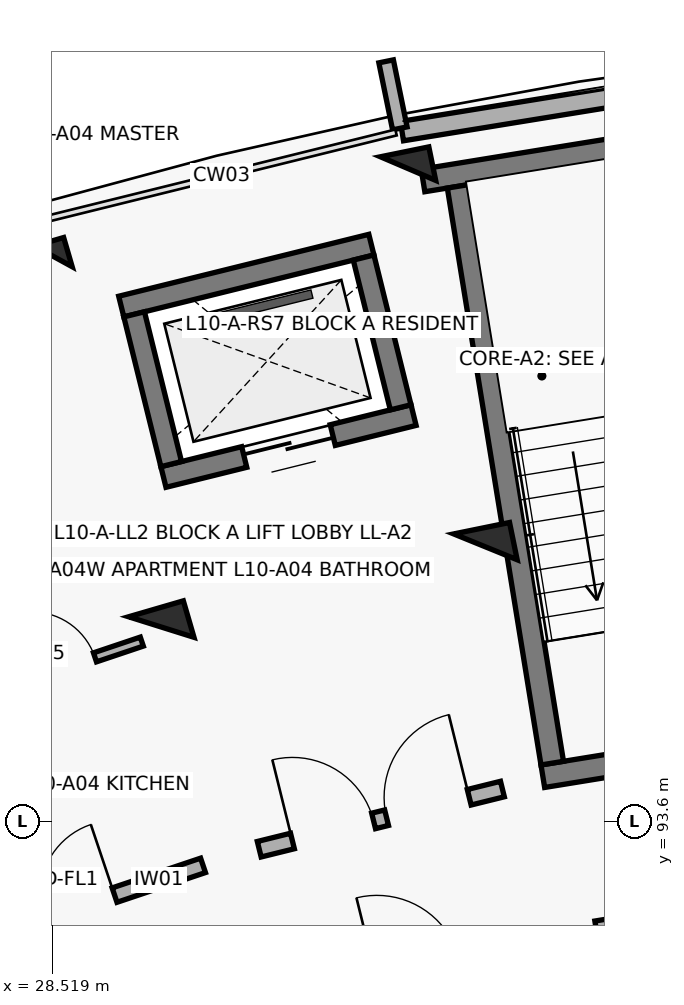
"""IFC4 building model, lengths in metres.
Left out: names, types, materials, properties, quantities, classifications, styles, units other than length and angle.
Written with IfcOpenShell. Run it as: python <this file> out.ifc"""

import sys

from ifc_helpers import new_model, si_unit, direction, frame, frame_2d, origin, origin_2d, place, context, subcontext, project, spatial, rectangle, extrude, element, fill, save


model = new_model("IFC4")
c1 = context("Model", 3, precision=1e-05, world=origin(), true_north=direction((0.0, 1.0)))
c2 = subcontext(c1, "Body", "Model", "MODEL_VIEW")
j1 = project(units=[si_unit("LENGTHUNIT", "METRE"), si_unit("PLANEANGLEUNIT", "RADIAN")], contexts=[c1])
p1 = place(None, origin())
s1 = spatial("IfcSite", under=j1, at=p1, CompositionType="ELEMENT")
p2 = place(p1, origin())
s2 = spatial("IfcBuilding", under=s1, at=p2, CompositionType="ELEMENT")
p3 = place(p2, frame((0.0, 0.0, 32.9)))
s3 = spatial("IfcBuildingStorey", under=s2, at=p3, CompositionType="ELEMENT", Elevation=32.9)
p4 = place(p3, frame((29.954, 96.153, 0.0), z_axis=(0.0, 0.0, 1.0), x_axis=(-0.27966144946, 0.96009867914, 0.0)))
e1 = element("IfcColumn", 1, at=p4, inside=s3, PredefinedType="COLUMN", context=c2, shape_type="SweptSolid", body=[
    extrude(rectangle(XDim=0.5, YDim=0.75, at=origin_2d()), origin(), (0.0, 0.0, 1.0), 3.1),
])
p5 = place(p3, frame((28.533, 101.031, 0.0), z_axis=(0.0, 0.0, 1.0), x_axis=(-0.27966144946, 0.96009867914, 0.0)))
e2 = element("IfcColumn", 2, at=p5, inside=s3, PredefinedType="COLUMN", context=c2, shape_type="SweptSolid", body=[
    extrude(rectangle(XDim=0.4, YDim=0.4, at=origin_2d()), origin(), (0.0, 0.0, 1.0), 3.1),
])
p6 = place(p3, frame((34.219, 97.209, 0.0), z_axis=(0.0, 0.0, 1.0), x_axis=(-0.200393999665, 0.979715389742, 0.0)))
e3 = element("IfcColumn", 3, at=p6, inside=s3, PredefinedType="COLUMN", context=c2, shape_type="SweptSolid", body=[
    extrude(rectangle(XDim=0.5, YDim=0.75, at=origin_2d()), origin(), (0.0, 0.0, 1.0), 3.1),
])
p7 = place(p3, frame((33.201, 102.186, 0.0), z_axis=(0.0, 0.0, 1.0), x_axis=(-0.200393999665, 0.979715389742, 0.0)))
e4 = element("IfcColumn", 4, at=p7, inside=s3, PredefinedType="COLUMN", context=c2, shape_type="SweptSolid", body=[
    extrude(rectangle(XDim=0.45, YDim=0.65, at=origin_2d()), origin(), (0.0, 0.0, 1.0), 3.1),
])
p8 = place(p3, frame((33.12, 102.679, 0.0), z_axis=(0.0, 0.0, 1.0), x_axis=(0.987080750493, 0.160223568819, 0.0)))
e5 = element("IfcWall", 5, at=p8, inside=s3, PredefinedType="SOLIDWALL", context=c2, shape_type="SweptSolid", body=[
    extrude(rectangle(XDim=4.809, YDim=0.258, at=frame_2d((2.404, 0.0))), origin(), (0.0, 0.0, 1.0), 2.25),
])
p9 = place(p3, frame((33.093, 102.715, 0.0), z_axis=(0.0, 0.0, 1.0), x_axis=(-0.200183211319, 0.979758481416, 0.0)))
e6 = element("IfcWall", 6, at=p9, inside=s3, PredefinedType="PARAPET", context=c2, shape_type="SweptSolid", body=[
    extrude(rectangle(XDim=0.9, YDim=0.195, at=frame_2d((0.45, 0.0))), origin(), (0.0, 0.0, 1.0), 2.25),
])
p10 = place(p3, frame((38.794, 94.811, 0.0), z_axis=(0.0, 0.0, 1.0), x_axis=(-0.987077443397, -0.160243941341, 0.0)))
e7 = element("IfcWall", 7, at=p10, inside=s3, PredefinedType="SHEAR", context=c2, shape_type="SweptSolid", body=[
    extrude(rectangle(XDim=3.87, YDim=0.3, at=frame_2d((1.935, 0.0))), origin(), (0.0, 0.0, 1.0), 3.1),
])
p11 = place(p10, frame((1.41, 0.0, 0.0)))
e8 = element("IfcOpeningElement", 8, at=p11, cuts=e7, PredefinedType="OPENING", context=c2, shape_type="SweptSolid", body=[
    extrude(rectangle(XDim=1.05, YDim=2.15, at=frame_2d((0.525, 1.075))), frame((0.0, 0.16, 0.0), z_axis=(0.0, -1.0, 0.0), x_axis=(1.0, 0.0, 0.0)), (0.0, 0.0, 1.0), 0.32),
])
p12 = place(p3, frame((37.81, 102.745, 0.0), z_axis=(0.0, 0.0, 1.0), x_axis=(-0.987084710126, -0.160199173019, 0.0)))
e9 = element("IfcWall", 9, at=p12, inside=s3, PredefinedType="SHEAR", context=c2, shape_type="SweptSolid", body=[
    extrude(rectangle(XDim=4.47, YDim=0.3, at=frame_2d((2.235, 0.0))), origin(), (0.0, 0.0, 1.0), 3.1),
])
p13 = place(p3, frame((35.098, 94.363, 0.0), z_axis=(0.0, 0.0, 1.0), x_axis=(-0.160227496777, 0.987080112897, 0.0)))
e10 = element("IfcWall", 10, at=p13, inside=s3, PredefinedType="SHEAR", context=c2, shape_type="SweptSolid", body=[
    extrude(rectangle(XDim=7.69, YDim=0.3, at=frame_2d((3.845, 0.0))), origin(), (0.0, 0.0, 1.0), 3.1),
])
p14 = place(p3, frame((33.273, 98.942, 0.0), z_axis=(0.0, 0.0, 1.0), x_axis=(-0.970707542441, -0.240264160972, 0.0)))
e11 = element("IfcWall", 11, at=p14, inside=s3, PredefinedType="SHEAR", context=c2, shape_type="SweptSolid", body=[
    extrude(rectangle(XDim=3.39, YDim=0.28, at=frame_2d((1.695, 0.0))), origin(), (0.0, 0.0, 1.0), 3.1),
])
p15 = place(p14, frame((1.095, 0.0, 0.0)))
e12 = element("IfcOpeningElement", 12, at=p15, cuts=e11, PredefinedType="OPENING", context=c2, shape_type="SweptSolid", body=[
    extrude(rectangle(XDim=1.2, YDim=2.15, at=frame_2d((0.6, 1.075))), frame((0.0, 0.15, 0.0), z_axis=(0.0, -1.0, 0.0), x_axis=(1.0, 0.0, 0.0)), (0.0, 0.0, 1.0), 0.3),
])
p16 = place(p3, frame((32.718, 101.185, 0.0), z_axis=(0.0, 0.0, 1.0), x_axis=(-0.970711699588, -0.240247364777, 0.0)))
e13 = element("IfcWall", 13, at=p16, inside=s3, PredefinedType="SHEAR", context=c2, shape_type="SweptSolid", body=[
    extrude(rectangle(XDim=3.39, YDim=0.28, at=frame_2d((1.695, 0.0))), origin(), (0.0, 0.0, 1.0), 3.1),
])
p17 = place(p3, frame((33.104, 99.044, 0.0), z_axis=(0.0, 0.0, 1.0), x_axis=(-0.240186044774, 0.970726873995, 0.0)))
e14 = element("IfcWall", 14, at=p17, inside=s3, PredefinedType="SHEAR", context=c2, shape_type="SweptSolid", body=[
    extrude(rectangle(XDim=2.03, YDim=0.28, at=frame_2d((1.015, 0.0))), origin(), (0.0, 0.0, 1.0), 3.1),
])
p18 = place(p3, frame((30.085, 98.297, 0.0), z_axis=(0.0, 0.0, 1.0), x_axis=(-0.2402993748, 0.970698825832, 0.0)))
e15 = element("IfcWall", 15, at=p18, inside=s3, PredefinedType="SHEAR", context=c2, shape_type="SweptSolid", body=[
    extrude(rectangle(XDim=2.03, YDim=0.28, at=frame_2d((1.015, 0.0))), origin(), (0.0, 0.0, 1.0), 3.1),
])
p19 = place(p3, frame((27.247, 91.923, 0.0), z_axis=(0.0, 0.0, 1.0), x_axis=(0.947863007629, 0.318678080151, 0.0)))
e16 = element("IfcWall", 16, at=p19, inside=s3, PredefinedType="SOLIDWALL", context=c2, shape_type="SweptSolid", body=[
    extrude(rectangle(XDim=3.436, YDim=0.2, at=frame_2d((1.718, 0.0))), origin(), (0.0, 0.0, 1.0), 2.08),
])
p20 = place(p19, frame((1.228, 0.0, 0.0)))
e17 = element("IfcOpeningElement", 17, at=p20, cuts=e16, PredefinedType="OPENING", context=c2, shape_type="SweptSolid", body=[
    extrude(rectangle(XDim=0.98, YDim=2.15, at=frame_2d((0.49, 1.075))), frame((0.0, 0.11, 0.0), z_axis=(0.0, -1.0, 0.0), x_axis=(1.0, 0.0, 0.0)), (0.0, 0.0, 1.0), 0.22),
])
p21 = place(p3, frame((26.11, 94.756, 0.0), z_axis=(0.0, 0.0, 1.0), x_axis=(0.947873924847, 0.318645606584, 0.0)))
e18 = element("IfcWall", 18, at=p21, inside=s3, PredefinedType="PARTITIONING", context=c2, shape_type="SweptSolid", body=[
    extrude(rectangle(XDim=3.785, YDim=0.125, at=frame_2d((1.893, 0.0))), origin(), (0.0, 0.0, 1.0), 2.08),
])
p22 = place(p21, frame((0.65, 0.0, 0.0)))
e19 = element("IfcOpeningElement", 19, at=p22, cuts=e18, PredefinedType="OPENING", context=c2, shape_type="SweptSolid", body=[
    extrude(rectangle(XDim=0.9, YDim=2.1, at=frame_2d((0.45, 1.05))), frame((0.0, 0.073, 0.0), z_axis=(0.0, -1.0, 0.0), x_axis=(1.0, 0.0, 0.0)), (0.0, 0.0, 1.0), 0.145),
])
p23 = place(p21, frame((2.255, 0.0, 0.0)))
e20 = element("IfcOpeningElement", 20, at=p23, cuts=e18, PredefinedType="OPENING", context=c2, shape_type="SweptSolid", body=[
    extrude(rectangle(XDim=0.88, YDim=2.1, at=frame_2d((0.44, 1.05))), frame((0.0, 0.073, 0.0), z_axis=(0.0, -1.0, 0.0), x_axis=(1.0, 0.0, 0.0)), (0.0, 0.0, 1.0), 0.145),
])
p24 = place(p3, frame((31.243, 93.23, 0.0), z_axis=(0.0, 0.0, 1.0), x_axis=(0.970719238682, 0.240216901263, 0.0)))
e21 = element("IfcWall", 21, at=p24, inside=s3, PredefinedType="SOLIDWALL", context=c2, shape_type="SweptSolid", body=[
    extrude(rectangle(XDim=3.296, YDim=0.21, at=frame_2d((1.648, 0.0))), origin(), (0.0, 0.0, 1.0), 2.08),
])
p25 = place(p24, frame((0.45, 0.0, 0.0)))
e22 = element("IfcOpeningElement", 22, at=p25, cuts=e21, PredefinedType="OPENING", context=c2, shape_type="SweptSolid", body=[
    extrude(rectangle(XDim=1.1, YDim=2.15, at=frame_2d((0.55, 1.075))), frame((0.0, 0.115, 0.0), z_axis=(0.0, -1.0, 0.0), x_axis=(1.0, 0.0, 0.0)), (0.0, 0.0, 1.0), 0.23),
])
p26 = place(p24, frame((1.726, 0.0, 0.0)))
e23 = element("IfcOpeningElement", 23, at=p26, cuts=e21, PredefinedType="OPENING", context=c2, shape_type="SweptSolid", body=[
    extrude(rectangle(XDim=1.12, YDim=2.15, at=frame_2d((0.56, 1.075))), frame((0.0, 0.115, 0.0), z_axis=(0.0, -1.0, 0.0), x_axis=(1.0, 0.0, 0.0)), (0.0, 0.0, 1.0), 0.23),
])
p27 = place(p3, frame((35.676, 92.181, 0.0), z_axis=(0.0, 0.0, 1.0), x_axis=(0.98707079686, 0.160284877599, 0.0)))
e24 = element("IfcWall", 24, at=p27, inside=s3, PredefinedType="SOLIDWALL", context=c2, shape_type="SweptSolid", body=[
    extrude(rectangle(XDim=3.129, YDim=0.21, at=frame_2d((1.564, 0.0))), origin(), (0.0, 0.0, 1.0), 2.08),
])
p28 = place(p27, frame((1.014, 0.0, 0.0)))
e25 = element("IfcOpeningElement", 25, at=p28, cuts=e24, PredefinedType="OPENING", context=c2, shape_type="SweptSolid", body=[
    extrude(rectangle(XDim=1.1, YDim=2.15, at=frame_2d((0.55, 1.075))), frame((0.0, 0.115, 0.0), z_axis=(0.0, -1.0, 0.0), x_axis=(1.0, 0.0, 0.0)), (0.0, 0.0, 1.0), 0.23),
])
p29 = place(p15, origin())
e26 = element("IfcDoor", 26, at=p29, inside=s3, OperationType="DOUBLE_DOOR_SLIDING", PredefinedType="DOOR", context=c2, shape_type="SweptSolid", body=[
    extrude(rectangle(XDim=1.2, YDim=2.15, at=frame_2d((0.6, 1.075))), frame((0.0, 0.025, 0.0), z_axis=(0.0, -1.0, 0.0), x_axis=(1.0, 0.0, 0.0)), (0.0, 0.0, 1.0), 0.05),
])
fill(e12, e26)
p30 = place(p20, origin())
e27 = element("IfcDoor", 27, at=p30, inside=s3, OperationType="SINGLE_SWING_RIGHT", PredefinedType="DOOR", context=c2, shape_type="SweptSolid", body=[
    extrude(rectangle(XDim=0.98, YDim=2.15, at=frame_2d((0.49, 1.075))), frame((0.0, 0.025, 0.0), z_axis=(0.0, -1.0, 0.0), x_axis=(1.0, 0.0, 0.0)), (0.0, 0.0, 1.0), 0.05),
])
fill(e17, e27)
p31 = place(p23, origin())
e28 = element("IfcDoor", 28, at=p31, inside=s3, OperationType="SINGLE_SWING_LEFT", PredefinedType="DOOR", context=c2, shape_type="SweptSolid", body=[
    extrude(rectangle(XDim=0.88, YDim=2.1, at=frame_2d((0.44, 1.05))), frame((0.0, 0.025, 0.0), z_axis=(0.0, -1.0, 0.0), x_axis=(1.0, 0.0, 0.0)), (0.0, 0.0, 1.0), 0.05),
])
fill(e20, e28)
p32 = place(p25, origin())
e29 = element("IfcDoor", 29, at=p32, inside=s3, OperationType="SINGLE_SWING_LEFT", PredefinedType="DOOR", context=c2, shape_type="SweptSolid", body=[
    extrude(rectangle(XDim=1.1, YDim=2.15, at=frame_2d((0.55, 1.075))), frame((0.0, 0.025, 0.0), z_axis=(0.0, -1.0, 0.0), x_axis=(1.0, 0.0, 0.0)), (0.0, 0.0, 1.0), 0.05),
])
fill(e22, e29)
p33 = place(p26, origin())
e30 = element("IfcDoor", 30, at=p33, inside=s3, OperationType="SINGLE_SWING_RIGHT", PredefinedType="DOOR", context=c2, shape_type="SweptSolid", body=[
    extrude(rectangle(XDim=1.12, YDim=2.15, at=frame_2d((0.56, 1.075))), frame((0.0, 0.025, 0.0), z_axis=(0.0, -1.0, 0.0), x_axis=(1.0, 0.0, 0.0)), (0.0, 0.0, 1.0), 0.05),
])
fill(e23, e30)
save(model, sys.argv[1])
